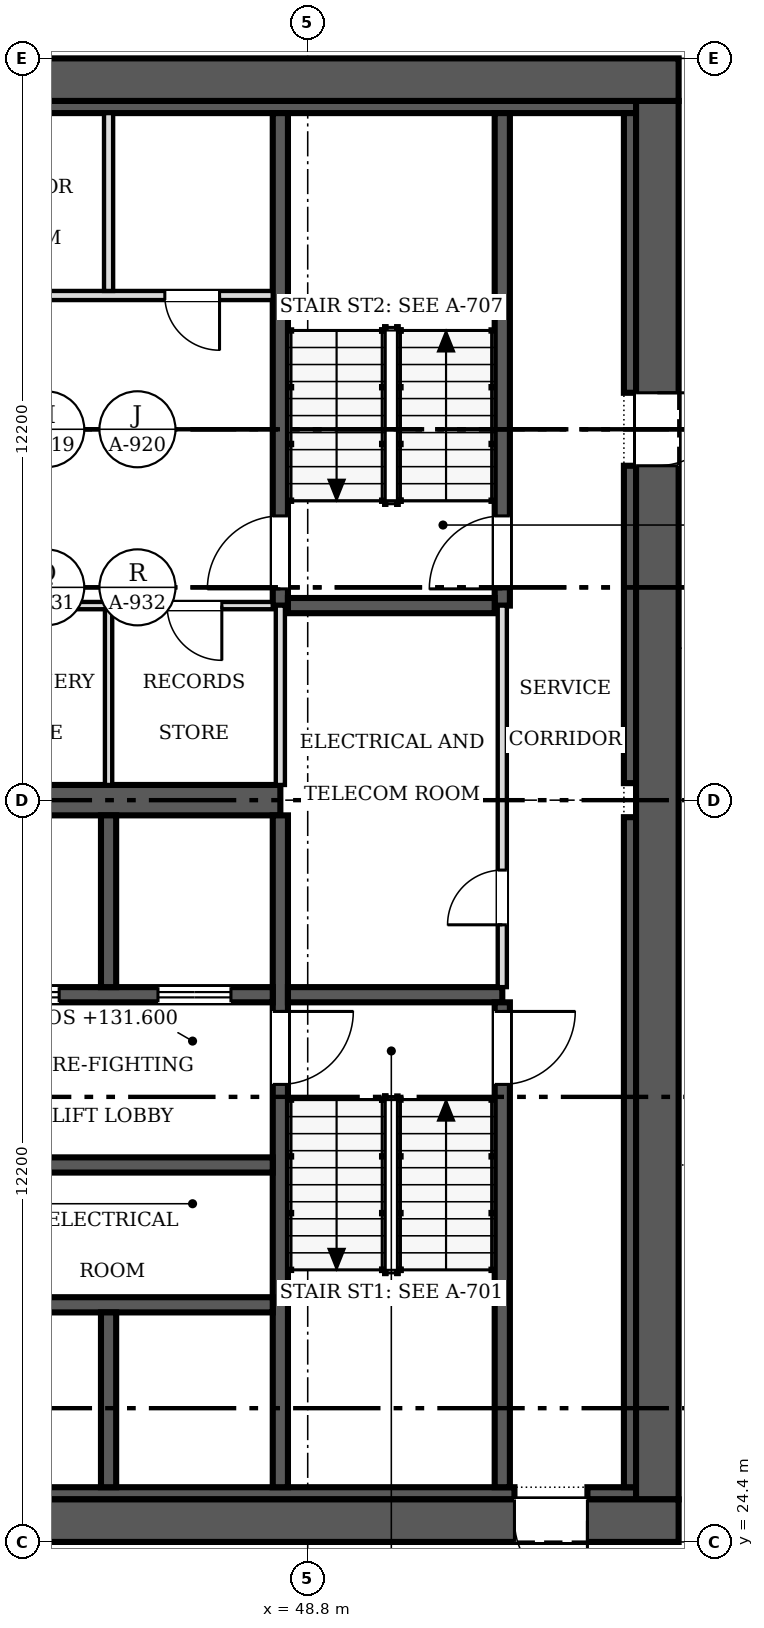
"""IFC4 building model, lengths in metres.
Left out: names, types, materials, properties, quantities, classifications, styles, units other than length and angle.
Written with IfcOpenShell. Run it as: python <this file> out.ifc"""

import sys

from ifc_helpers import new_model, si_unit, direction, frame, frame_2d, origin, place, context, subcontext, project, spatial, rectangle, extrude, source, transform, mapped, element, fill, save


model = new_model("IFC4")
c1 = context("Model", 3, precision=1e-05, world=origin(), true_north=direction((0.0, 1.0)))
c2 = subcontext(c1, "Body", "Model", "MODEL_VIEW")
j1 = project(units=[si_unit("LENGTHUNIT", "METRE"), si_unit("PLANEANGLEUNIT", "RADIAN")], contexts=[c1])
p1 = place(None, origin())
s1 = spatial("IfcSite", under=j1, at=p1, CompositionType="ELEMENT")
p2 = place(p1, origin())
s2 = spatial("IfcBuilding", under=s1, at=p2, CompositionType="ELEMENT")
p3 = place(p2, frame((0.0, 0.0, 131.6)))
s3 = spatial("IfcBuildingStorey", under=s2, at=p3, CompositionType="ELEMENT", Elevation=131.6)
p4 = place(p3, frame((54.9, 24.75, 0.0), z_axis=(0.0, 0.0, 1.0), x_axis=(-1.0, 0.0, 0.0)))
e1 = element("IfcWall", 1, at=p4, inside=s3, PredefinedType="SHEAR", context=c2, shape_type="SweptSolid", body=[
    extrude(rectangle(XDim=24.4, YDim=0.7, at=frame_2d((12.2, 0.0))), origin(), (0.0, 0.0, 1.0), 3.8),
])
m1 = source(origin(), c2, "Body", "SweptSolid", [
    extrude(rectangle(XDim=1.2, YDim=2.1, at=frame_2d((0.6, 1.05))), frame((0.0, 0.36, 0.0), z_axis=(0.0, -1.0, 0.0), x_axis=(1.0, 0.0, 0.0)), (0.0, 0.0, 1.0), 0.72),
])
p5 = place(p4, frame((1.5, 0.0, 0.0)))
e2 = element("IfcOpeningElement", 2, at=p5, cuts=e1, PredefinedType="OPENING", context=c2, shape_type="MappedRepresentation", body=[
    mapped(m1, transform((0.0, 0.0, 0.0), scale=1.0)),
])
p6 = place(p3, frame((30.5, 48.45, 0.0), z_axis=(0.0, 0.0, 1.0), x_axis=(1.0, 0.0, 0.0)))
e3 = element("IfcWall", 3, at=p6, inside=s3, PredefinedType="SHEAR", context=c2, shape_type="SweptSolid", body=[
    extrude(rectangle(XDim=24.4, YDim=0.7, at=frame_2d((12.2, 0.0))), origin(), (0.0, 0.0, 1.0), 3.8),
])
p7 = place(p3, frame((54.55, 48.1, 0.0), z_axis=(0.0, 0.0, 1.0), x_axis=(0.0, -1.0, 0.0)))
e4 = element("IfcWall", 4, at=p7, inside=s3, PredefinedType="SHEAR", context=c2, shape_type="SweptSolid", body=[
    extrude(rectangle(XDim=23.0, YDim=0.7, at=frame_2d((11.5, 0.0))), origin(), (0.0, 0.0, 1.0), 3.8),
])
p8 = place(p7, frame((4.8, 0.0, 0.0)))
e5 = element("IfcOpeningElement", 5, at=p8, cuts=e4, PredefinedType="OPENING", context=c2, shape_type="MappedRepresentation", body=[
    mapped(m1, transform((0.0, 0.0, 0.0), scale=1.0)),
])
p9 = place(p3, frame((31.2, 25.2, 0.0), z_axis=(0.0, 0.0, 1.0), x_axis=(1.0, 0.0, 0.0)))
e6 = element("IfcWall", 6, at=p9, inside=s3, PredefinedType="SOLIDWALL", context=c2, shape_type="SweptSolid", body=[
    extrude(rectangle(XDim=21.0, YDim=0.2, at=frame_2d((10.5, 0.0))), origin(), (0.0, 0.0, 1.0), 3.8),
])
p10 = place(p3, frame((53.4, 25.2, 0.0), z_axis=(0.0, 0.0, 1.0), x_axis=(1.0, 0.0, 0.0)))
e7 = element("IfcWall", 7, at=p10, inside=s3, PredefinedType="SOLIDWALL", context=c2, shape_type="SweptSolid", body=[
    extrude(rectangle(XDim=0.8, YDim=0.2, at=frame_2d((0.4, 0.0))), origin(), (0.0, 0.0, 1.0), 3.8),
])
p11 = place(p3, frame((31.2, 48.0, 0.0), z_axis=(0.0, 0.0, 1.0), x_axis=(1.0, 0.0, 0.0)))
e8 = element("IfcWall", 8, at=p11, inside=s3, PredefinedType="SOLIDWALL", context=c2, shape_type="SweptSolid", body=[
    extrude(rectangle(XDim=23.0, YDim=0.2, at=frame_2d((11.5, 0.0))), origin(), (0.0, 0.0, 1.0), 3.8),
])
p12 = place(p3, frame((54.1, 25.3, 0.0), z_axis=(0.0, 0.0, 1.0), x_axis=(0.0, 1.0, 0.0)))
e9 = element("IfcWall", 9, at=p12, inside=s3, PredefinedType="SOLIDWALL", context=c2, shape_type="SweptSolid", body=[
    extrude(rectangle(XDim=11.02, YDim=0.2, at=frame_2d((5.51, 0.0))), origin(), (0.0, 0.0, 1.0), 3.8),
])
p13 = place(p3, frame((54.1, 36.88, 0.0), z_axis=(0.0, 0.0, 1.0), x_axis=(0.0, 1.0, 0.0)))
e10 = element("IfcWall", 10, at=p13, inside=s3, PredefinedType="SOLIDWALL", context=c2, shape_type="SweptSolid", body=[
    extrude(rectangle(XDim=5.22, YDim=0.2, at=frame_2d((2.61, 0.0))), origin(), (0.0, 0.0, 1.0), 3.8),
])
p14 = place(p3, frame((54.1, 43.3, 0.0), z_axis=(0.0, 0.0, 1.0), x_axis=(0.0, 1.0, 0.0)))
e11 = element("IfcWall", 11, at=p14, inside=s3, PredefinedType="SOLIDWALL", context=c2, shape_type="SweptSolid", body=[
    extrude(rectangle(XDim=4.6, YDim=0.2, at=frame_2d((2.3, 0.0))), origin(), (0.0, 0.0, 1.0), 3.8),
])
p15 = place(p3, frame((31.4, 36.6, 0.0), z_axis=(0.0, 0.0, 1.0), x_axis=(1.0, 0.0, 0.0)))
e12 = element("IfcWall", 12, at=p15, inside=s3, PredefinedType="SHEAR", context=c2, shape_type="SweptSolid", body=[
    extrude(rectangle(XDim=16.95, YDim=0.5, at=frame_2d((8.475, 0.0))), origin(), (0.0, 0.0, 1.0), 3.8),
])
p16 = place(p3, frame((48.35, 36.35, 0.0), z_axis=(0.0, 0.0, 1.0), x_axis=(0.0, -1.0, 0.0)))
e13 = element("IfcWall", 13, at=p16, inside=s3, PredefinedType="SOLIDWALL", context=c2, shape_type="SweptSolid", body=[
    extrude(rectangle(XDim=11.05, YDim=0.25, at=frame_2d((5.525, 0.0))), origin(), (0.0, 0.0, 1.0), 3.8),
])
m2 = source(origin(), c2, "Body", "SweptSolid", [
    extrude(rectangle(XDim=1.2, YDim=2.1, at=frame_2d((0.6, 1.05))), frame((0.0, 0.135, 0.0), z_axis=(0.0, -1.0, 0.0), x_axis=(1.0, 0.0, 0.0)), (0.0, 0.0, 1.0), 0.27),
])
p17 = place(p16, frame((3.225, 0.0, 0.0)))
e14 = element("IfcOpeningElement", 14, at=p17, cuts=e13, PredefinedType="OPENING", context=c2, shape_type="MappedRepresentation", body=[
    mapped(m2, transform((0.0, 0.0, 0.0), scale=1.0)),
])
p18 = place(p3, frame((48.225, 33.4, 0.0), z_axis=(0.0, 0.0, 1.0), x_axis=(-1.0, 0.0, 0.0)))
e15 = element("IfcWall", 15, at=p18, inside=s3, PredefinedType="SOLIDWALL", context=c2, shape_type="SweptSolid", body=[
    extrude(rectangle(XDim=5.275, YDim=0.25, at=frame_2d((2.638, 0.0))), origin(), (0.0, 0.0, 1.0), 3.8),
])
p19 = place(p18, frame((3.512, 0.0, 0.0)))
e16 = element("IfcOpeningElement", 16, at=p19, cuts=e15, PredefinedType="OPENING", context=c2, shape_type="MappedRepresentation", body=[
    mapped(m2, transform((0.0, 0.0, 0.0), scale=1.0)),
])
p20 = place(p18, frame((0.688, 0.0, 0.0)))
e17 = element("IfcOpeningElement", 17, at=p20, cuts=e15, PredefinedType="OPENING", context=c2, shape_type="MappedRepresentation", body=[
    mapped(m2, transform((0.0, 0.0, 0.0), scale=1.0)),
])
p21 = place(p3, frame((48.475, 33.4, 0.0), z_axis=(0.0, 0.0, 1.0), x_axis=(1.0, 0.0, 0.0)))
e18 = element("IfcWall", 18, at=p21, inside=s3, PredefinedType="SOLIDWALL", context=c2, shape_type="SweptSolid", body=[
    extrude(rectangle(XDim=3.525, YDim=0.25, at=frame_2d((1.762, 0.0))), origin(), (0.0, 0.0, 1.0), 3.8),
])
p22 = place(p3, frame((48.35, 47.9, 0.0), z_axis=(0.0, 0.0, 1.0), x_axis=(0.0, -1.0, 0.0)))
e19 = element("IfcWall", 19, at=p22, inside=s3, PredefinedType="SOLIDWALL", context=c2, shape_type="SweptSolid", body=[
    extrude(rectangle(XDim=8.1, YDim=0.25, at=frame_2d((4.05, 0.0))), origin(), (0.0, 0.0, 1.0), 3.8),
])
p23 = place(p22, frame((6.625, 0.0, 0.0)))
e20 = element("IfcOpeningElement", 20, at=p23, cuts=e19, PredefinedType="OPENING", context=c2, shape_type="MappedRepresentation", body=[
    mapped(m2, transform((0.0, 0.0, 0.0), scale=1.0)),
])
p24 = place(p3, frame((52.0, 25.3, 0.0), z_axis=(0.0, 0.0, 1.0), x_axis=(0.0, 1.0, 0.0)))
e21 = element("IfcWall", 21, at=p24, inside=s3, PredefinedType="SOLIDWALL", context=c2, shape_type="SweptSolid", body=[
    extrude(rectangle(XDim=7.975, YDim=0.25, at=frame_2d((3.987, 0.0))), origin(), (0.0, 0.0, 1.0), 3.8),
])
p25 = place(p24, frame((6.625, 0.0, 0.0)))
e22 = element("IfcOpeningElement", 22, at=p25, cuts=e21, PredefinedType="OPENING", context=c2, shape_type="MappedRepresentation", body=[
    mapped(m2, transform((0.0, 0.0, 0.0), scale=1.0)),
])
p26 = place(p3, frame((52.0, 39.8, 0.0), z_axis=(0.0, 0.0, 1.0), x_axis=(0.0, 1.0, 0.0)))
e23 = element("IfcWall", 23, at=p26, inside=s3, PredefinedType="SOLIDWALL", context=c2, shape_type="SweptSolid", body=[
    extrude(rectangle(XDim=8.1, YDim=0.25, at=frame_2d((4.05, 0.0))), origin(), (0.0, 0.0, 1.0), 3.8),
])
p27 = place(p26, frame((0.275, 0.0, 0.0)))
e24 = element("IfcOpeningElement", 24, at=p27, cuts=e23, PredefinedType="OPENING", context=c2, shape_type="MappedRepresentation", body=[
    mapped(m2, transform((0.0, 0.0, 0.0), scale=1.0)),
])
for number, where, z_axis, x_axis in (
    (25, (42.95, 28.3, 0.0), (0.0, 0.0, 1.0), (1.0, 0.0, 0.0)),
    (26, (42.95, 30.6, 0.0), (0.0, 0.0, 1.0), (1.0, 0.0, 0.0)),
):
    element("IfcWall", number, at=place(p3, frame(where, z_axis=z_axis, x_axis=x_axis)), inside=s3, PredefinedType="SOLIDWALL", context=c2, shape_type="SweptSolid", body=[
        extrude(rectangle(XDim=5.275, YDim=0.25, at=frame_2d((2.638, 0.0))), origin(), (0.0, 0.0, 1.0), 3.8),
    ])
p28 = place(p3, frame((48.475, 39.8, 0.0), z_axis=(0.0, 0.0, 1.0), x_axis=(1.0, 0.0, 0.0)))
e27 = element("IfcWall", 27, at=p28, inside=s3, PredefinedType="SOLIDWALL", context=c2, shape_type="SweptSolid", body=[
    extrude(rectangle(XDim=3.4, YDim=0.25, at=frame_2d((1.7, 0.0))), origin(), (0.0, 0.0, 1.0), 3.8),
])
p29 = place(p3, frame((45.525, 33.525, 0.0), z_axis=(0.0, 0.0, 1.0), x_axis=(0.0, 1.0, 0.0)))
e28 = element("IfcWall", 28, at=p29, inside=s3, PredefinedType="SOLIDWALL", context=c2, shape_type="SweptSolid", body=[
    extrude(rectangle(XDim=2.825, YDim=0.25, at=frame_2d((1.413, 0.0))), origin(), (0.0, 0.0, 1.0), 3.8),
])
p30 = place(p3, frame((45.525, 25.3, 0.0), z_axis=(0.0, 0.0, 1.0), x_axis=(0.0, 1.0, 0.0)))
e29 = element("IfcWall", 29, at=p30, inside=s3, PredefinedType="SOLIDWALL", context=c2, shape_type="SweptSolid", body=[
    extrude(rectangle(XDim=2.875, YDim=0.25, at=frame_2d((1.438, 0.0))), origin(), (0.0, 0.0, 1.0), 3.8),
])
p31 = place(p3, frame((52.0, 33.525, 0.0), z_axis=(0.0, 0.0, 1.0), x_axis=(0.0, 1.0, 0.0)))
e30 = element("IfcWall", 30, at=p31, inside=s3, PredefinedType="PARTITIONING", context=c2, shape_type="SweptSolid", body=[
    extrude(rectangle(XDim=6.275, YDim=0.15, at=frame_2d((3.138, 0.0))), origin(), (0.0, 0.0, 1.0), 3.6),
])
m3 = source(origin(), c2, "Body", "SweptSolid", [
    extrude(rectangle(XDim=0.9, YDim=2.1, at=frame_2d((0.45, 1.05))), frame((0.0, 0.085, 0.0), z_axis=(0.0, -1.0, 0.0), x_axis=(1.0, 0.0, 0.0)), (0.0, 0.0, 1.0), 0.17),
])
p32 = place(p31, frame((1.025, 0.0, 0.0)))
e31 = element("IfcOpeningElement", 31, at=p32, cuts=e30, PredefinedType="OPENING", context=c2, shape_type="MappedRepresentation", body=[
    mapped(m3, transform((0.0, 0.0, 0.0), scale=1.0)),
])
p33 = place(p3, frame((48.225, 39.8, 0.0), z_axis=(0.0, 0.0, 1.0), x_axis=(-1.0, 0.0, 0.0)))
e32 = element("IfcWall", 32, at=p33, inside=s3, PredefinedType="PARTITIONING", context=c2, shape_type="SweptSolid", body=[
    extrude(rectangle(XDim=5.275, YDim=0.12, at=frame_2d((2.638, 0.0))), origin(), (0.0, 0.0, 1.0), 3.6),
])
m4 = source(origin(), c2, "Body", "SweptSolid", [
    extrude(rectangle(XDim=0.9, YDim=2.1, at=frame_2d((0.45, 1.05))), frame((0.0, 0.07, 0.0), z_axis=(0.0, -1.0, 0.0), x_axis=(1.0, 0.0, 0.0)), (0.0, 0.0, 1.0), 0.14),
])
p34 = place(p33, frame((3.663, 0.0, 0.0)))
e33 = element("IfcOpeningElement", 33, at=p34, cuts=e32, PredefinedType="OPENING", context=c2, shape_type="MappedRepresentation", body=[
    mapped(m4, transform((0.0, 0.0, 0.0), scale=1.0)),
])
p35 = place(p33, frame((0.837, 0.0, 0.0)))
e34 = element("IfcOpeningElement", 34, at=p35, cuts=e32, PredefinedType="OPENING", context=c2, shape_type="MappedRepresentation", body=[
    mapped(m4, transform((0.0, 0.0, 0.0), scale=1.0)),
])
p36 = place(p3, frame((42.95, 44.9, 0.0), z_axis=(0.0, 0.0, 1.0), x_axis=(1.0, 0.0, 0.0)))
e35 = element("IfcWall", 35, at=p36, inside=s3, PredefinedType="PARTITIONING", context=c2, shape_type="SweptSolid", body=[
    extrude(rectangle(XDim=5.275, YDim=0.15, at=frame_2d((2.638, 0.0))), origin(), (0.0, 0.0, 1.0), 3.6),
])
p37 = place(p36, frame((0.712, 0.0, 0.0)))
e36 = element("IfcOpeningElement", 36, at=p37, cuts=e35, PredefinedType="OPENING", context=c2, shape_type="MappedRepresentation", body=[
    mapped(m3, transform((0.0, 0.0, 0.0), scale=1.0)),
])
p38 = place(p36, frame((3.5, 0.0, 0.0)))
e37 = element("IfcOpeningElement", 37, at=p38, cuts=e35, PredefinedType="OPENING", context=c2, shape_type="MappedRepresentation", body=[
    mapped(m3, transform((0.0, 0.0, 0.0), scale=1.0)),
])
p39 = place(p3, frame((45.525, 36.85, 0.0), z_axis=(0.0, 0.0, 1.0), x_axis=(0.0, 1.0, 0.0)))
e38 = element("IfcWall", 38, at=p39, inside=s3, PredefinedType="PARTITIONING", context=c2, shape_type="SweptSolid", body=[
    extrude(rectangle(XDim=2.89, YDim=0.12, at=frame_2d((1.445, 0.0))), origin(), (0.0, 0.0, 1.0), 3.6),
])
p40 = place(p3, frame((48.35, 36.85, 0.0), z_axis=(0.0, 0.0, 1.0), x_axis=(0.0, 1.0, 0.0)))
e39 = element("IfcWall", 39, at=p40, inside=s3, PredefinedType="PARTITIONING", context=c2, shape_type="SweptSolid", body=[
    extrude(rectangle(XDim=2.95, YDim=0.15, at=frame_2d((1.475, 0.0))), origin(), (0.0, 0.0, 1.0), 3.6),
])
p41 = place(p3, frame((45.525, 44.975, 0.0), z_axis=(0.0, 0.0, 1.0), x_axis=(0.0, 1.0, 0.0)))
e40 = element("IfcWall", 40, at=p41, inside=s3, PredefinedType="PARTITIONING", context=c2, shape_type="SweptSolid", body=[
    extrude(rectangle(XDim=2.925, YDim=0.15, at=frame_2d((1.462, 0.0))), origin(), (0.0, 0.0, 1.0), 3.6),
])
m5 = source(origin(), c2, "Body", "SweptSolid", [
    extrude(rectangle(XDim=1.2, YDim=2.1, at=frame_2d((0.6, 1.05))), frame((0.0, 0.025, 0.0), z_axis=(0.0, -1.0, 0.0), x_axis=(1.0, 0.0, 0.0)), (0.0, 0.0, 1.0), 0.05),
])
p42 = place(p5, origin())
e41 = element("IfcDoor", 41, at=p42, inside=s3, OperationType="SINGLE_SWING_LEFT", PredefinedType="DOOR", context=c2, shape_type="MappedRepresentation", body=[
    mapped(m5, transform((0.0, 0.0, 0.0), scale=1.0)),
])
fill(e2, e41)
p43 = place(p8, origin())
e42 = element("IfcDoor", 42, at=p43, inside=s3, OperationType="SINGLE_SWING_LEFT", PredefinedType="DOOR", context=c2, shape_type="MappedRepresentation", body=[
    mapped(m5, transform((0.0, 0.0, 0.0), scale=1.0)),
])
fill(e5, e42)
p44 = place(p17, origin())
e43 = element("IfcDoor", 43, at=p44, inside=s3, OperationType="SINGLE_SWING_LEFT", PredefinedType="DOOR", context=c2, shape_type="MappedRepresentation", body=[
    mapped(m5, transform((0.0, 0.0, 0.0), scale=1.0)),
])
fill(e14, e43)
p45 = place(p19, origin())
e44 = element("IfcDoor", 44, at=p45, inside=s3, OperationType="DOUBLE_DOOR_SLIDING", PredefinedType="DOOR", context=c2, shape_type="MappedRepresentation", body=[
    mapped(m5, transform((0.0, 0.0, 0.0), scale=1.0)),
])
fill(e16, e44)
p46 = place(p20, origin())
e45 = element("IfcDoor", 45, at=p46, inside=s3, OperationType="DOUBLE_DOOR_SLIDING", PredefinedType="DOOR", context=c2, shape_type="MappedRepresentation", body=[
    mapped(m5, transform((0.0, 0.0, 0.0), scale=1.0)),
])
fill(e17, e45)
p47 = place(p23, origin())
e46 = element("IfcDoor", 46, at=p47, inside=s3, OperationType="SINGLE_SWING_RIGHT", PredefinedType="DOOR", context=c2, shape_type="MappedRepresentation", body=[
    mapped(m5, transform((0.0, 0.0, 0.0), scale=1.0)),
])
fill(e20, e46)
p48 = place(p25, origin())
e47 = element("IfcDoor", 47, at=p48, inside=s3, OperationType="SINGLE_SWING_RIGHT", PredefinedType="DOOR", context=c2, shape_type="MappedRepresentation", body=[
    mapped(m5, transform((0.0, 0.0, 0.0), scale=1.0)),
])
fill(e22, e47)
p49 = place(p27, origin())
e48 = element("IfcDoor", 48, at=p49, inside=s3, OperationType="SINGLE_SWING_LEFT", PredefinedType="DOOR", context=c2, shape_type="MappedRepresentation", body=[
    mapped(m5, transform((0.0, 0.0, 0.0), scale=1.0)),
])
fill(e24, e48)
m6 = source(origin(), c2, "Body", "SweptSolid", [
    extrude(rectangle(XDim=0.9, YDim=2.1, at=frame_2d((0.45, 1.05))), frame((0.0, 0.025, 0.0), z_axis=(0.0, -1.0, 0.0), x_axis=(1.0, 0.0, 0.0)), (0.0, 0.0, 1.0), 0.05),
])
p50 = place(p32, origin())
e49 = element("IfcDoor", 49, at=p50, inside=s3, OperationType="SINGLE_SWING_LEFT", PredefinedType="DOOR", context=c2, shape_type="MappedRepresentation", body=[
    mapped(m6, transform((0.0, 0.0, 0.0), scale=1.0)),
])
fill(e31, e49)
p51 = place(p35, origin())
e50 = element("IfcDoor", 50, at=p51, inside=s3, OperationType="SINGLE_SWING_LEFT", PredefinedType="DOOR", context=c2, shape_type="MappedRepresentation", body=[
    mapped(m6, transform((0.0, 0.0, 0.0), scale=1.0)),
])
fill(e34, e50)
p52 = place(p38, origin())
e51 = element("IfcDoor", 51, at=p52, inside=s3, OperationType="SINGLE_SWING_RIGHT", PredefinedType="DOOR", context=c2, shape_type="MappedRepresentation", body=[
    mapped(m6, transform((0.0, 0.0, 0.0), scale=1.0)),
])
fill(e37, e51)
save(model, sys.argv[1])
